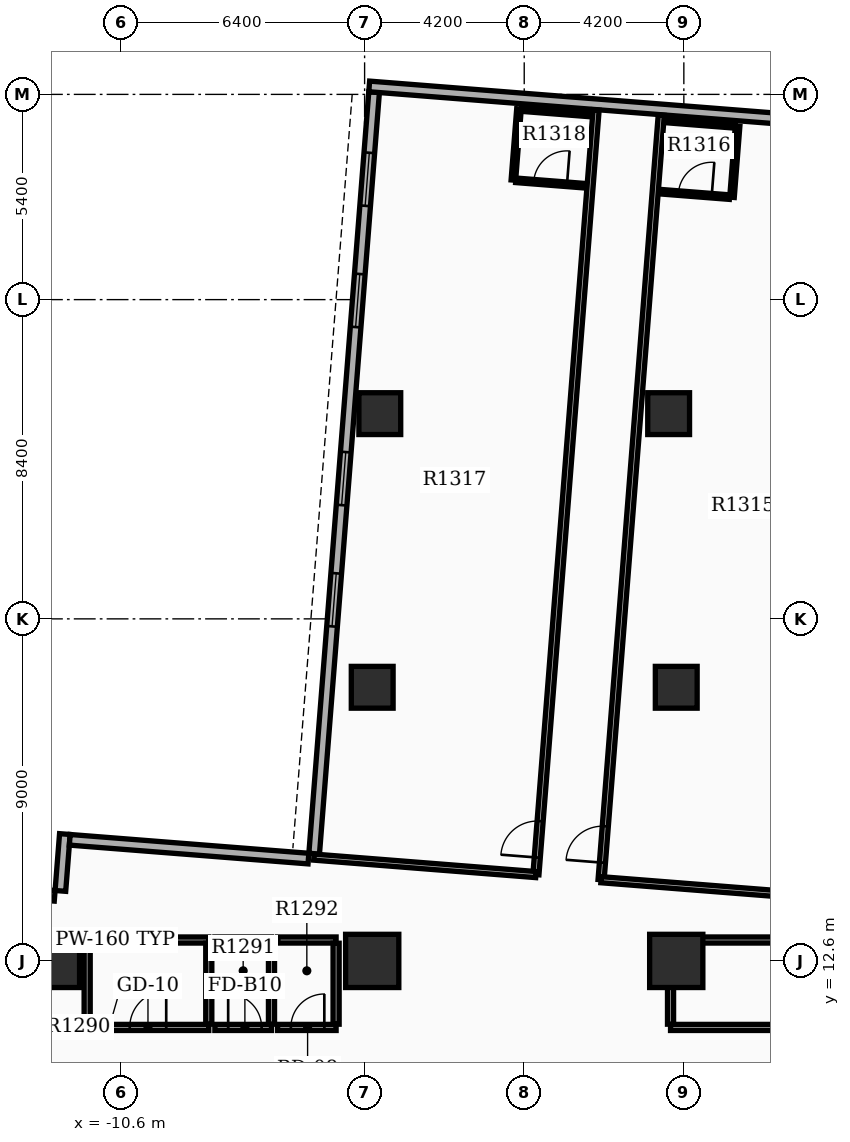
"""IFC4 building model, lengths in metres.
Left out: names, types, materials, properties, quantities, classifications, styles, units other than length and angle.
Written with IfcOpenShell. Run it as: python <this file> out.ifc"""

import sys

from ifc_helpers import new_model, si_unit, direction, frame, frame_2d, origin, origin_2d, place, context, subcontext, project, spatial, rectangle, extrude, element, fill, save


model = new_model("IFC4")
c1 = context("Model", 3, precision=1e-05, world=origin(), true_north=direction((0.0, 1.0)))
c2 = subcontext(c1, "Body", "Model", "MODEL_VIEW")
j1 = project(units=[si_unit("LENGTHUNIT", "METRE"), si_unit("PLANEANGLEUNIT", "RADIAN")], contexts=[c1])
p1 = place(None, origin())
s1 = spatial("IfcSite", under=j1, at=p1, CompositionType="ELEMENT")
p2 = place(p1, origin())
s2 = spatial("IfcBuilding", under=s1, at=p2, CompositionType="ELEMENT")
p3 = place(p2, frame((0.0, 0.0, 83.4)))
s3 = spatial("IfcBuildingStorey", under=s2, at=p3, CompositionType="ELEMENT", Elevation=83.4)
for number, where, z_axis, x_axis in (
    (1, (-12.4, 12.6, 0.0), (0.0, 0.0, 1.0), (1.0, 0.0, 0.0)),
    (2, (4.0, 12.6, 0.0), (0.0, 0.0, 1.0), (1.0, 0.0, 0.0)),
    (3, (-4.0, 12.6, 0.0), (0.0, 0.0, 1.0), (1.0, 0.0, 0.0)),
):
    element("IfcColumn", number, at=place(p3, frame(where, z_axis=z_axis, x_axis=x_axis)), inside=s3, PredefinedType="COLUMN", context=c2, shape_type="SweptSolid", body=[
        extrude(rectangle(XDim=1.4, YDim=1.4, at=origin_2d()), origin(), (0.0, 0.0, 1.0), 3.9),
    ])
for number, where, z_axis, x_axis in (
    (4, (-4.0, 19.8, 0.0), (0.0, 0.0, 1.0), (1.0, 0.0, 0.0)),
    (5, (4.0, 19.8, 0.0), (0.0, 0.0, 1.0), (1.0, 0.0, 0.0)),
    (6, (-3.8, 27.0, 0.0), (0.0, 0.0, 1.0), (1.0, 0.0, 0.0)),
    (7, (3.8, 27.0, 0.0), (0.0, 0.0, 1.0), (1.0, 0.0, 0.0)),
):
    element("IfcColumn", number, at=place(p3, frame(where, z_axis=z_axis, x_axis=x_axis)), inside=s3, PredefinedType="COLUMN", context=c2, shape_type="SweptSolid", body=[
        extrude(rectangle(XDim=1.1, YDim=1.1, at=origin_2d()), origin(), (0.0, 0.0, 1.0), 3.9),
    ])
p4 = place(p3, frame((-3.95, 35.459, 0.0), z_axis=(0.0, 0.0, 1.0), x_axis=(-0.078452802979, -0.996917828963, 0.0)))
e8 = element("IfcWall", 8, at=p4, inside=s3, PredefinedType="STANDARD", context=c2, shape_type="SweptSolid", body=[
    extrude(rectangle(XDim=20.1, YDim=0.28, at=frame_2d((10.05, 0.0))), origin(), (0.0, 0.0, 1.0), 2.91),
])
p5 = place(p4, frame((1.6, 0.0, 0.8)))
e9 = element("IfcOpeningElement", 9, at=p5, cuts=e8, PredefinedType="OPENING", context=c2, shape_type="SweptSolid", body=[
    extrude(rectangle(XDim=1.4, YDim=1.6, at=frame_2d((0.7, 0.8))), frame((0.0, 0.15, 0.0), z_axis=(0.0, -1.0, 0.0), x_axis=(1.0, 0.0, 0.0)), (0.0, 0.0, 1.0), 0.3),
])
p6 = place(p4, frame((4.8, 0.0, 0.8)))
e10 = element("IfcOpeningElement", 10, at=p6, cuts=e8, PredefinedType="OPENING", context=c2, shape_type="SweptSolid", body=[
    extrude(rectangle(XDim=1.4, YDim=1.6, at=frame_2d((0.7, 0.8))), frame((0.0, 0.15, 0.0), z_axis=(0.0, -1.0, 0.0), x_axis=(1.0, 0.0, 0.0)), (0.0, 0.0, 1.0), 0.3),
])
p7 = place(p4, frame((9.5, 0.0, 0.8)))
e11 = element("IfcOpeningElement", 11, at=p7, cuts=e8, PredefinedType="OPENING", context=c2, shape_type="SweptSolid", body=[
    extrude(rectangle(XDim=1.4, YDim=1.6, at=frame_2d((0.7, 0.8))), frame((0.0, 0.15, 0.0), z_axis=(0.0, -1.0, 0.0), x_axis=(1.0, 0.0, 0.0)), (0.0, 0.0, 1.0), 0.3),
])
p8 = place(p4, frame((12.7, 0.0, 0.8)))
e12 = element("IfcOpeningElement", 12, at=p8, cuts=e8, PredefinedType="OPENING", context=c2, shape_type="SweptSolid", body=[
    extrude(rectangle(XDim=1.4, YDim=1.6, at=frame_2d((0.7, 0.8))), frame((0.0, 0.15, 0.0), z_axis=(0.0, -1.0, 0.0), x_axis=(1.0, 0.0, 0.0)), (0.0, 0.0, 1.0), 0.3),
])
p9 = place(p3, frame((9.599, 34.533, 0.0), z_axis=(0.0, 0.0, 1.0), x_axis=(-0.996916198482, 0.078473519122, 0.0)))
e13 = element("IfcWall", 13, at=p9, inside=s3, PredefinedType="STANDARD", context=c2, shape_type="SweptSolid", body=[
    extrude(rectangle(XDim=13.72, YDim=0.28, at=frame_2d((6.86, 0.0))), origin(), (0.0, 0.0, 1.0), 2.91),
])
p10 = place(p9, frame((0.85, 0.0, 0.85)))
e14 = element("IfcOpeningElement", 14, at=p10, cuts=e13, PredefinedType="OPENING", context=c2, shape_type="SweptSolid", body=[
    extrude(rectangle(XDim=1.0, YDim=1.5, at=frame_2d((0.5, 0.75))), frame((0.0, 0.15, 0.0), z_axis=(0.0, -1.0, 0.0), x_axis=(1.0, 0.0, 0.0)), (0.0, 0.0, 1.0), 0.3),
])
p11 = place(p3, frame((-13.571, 14.409, 0.0), z_axis=(0.0, 0.0, 1.0), x_axis=(0.996918772, -0.078440818672, 0.0)))
e15 = element("IfcWall", 15, at=p11, inside=s3, PredefinedType="STANDARD", context=c2, shape_type="SweptSolid", body=[
    extrude(rectangle(XDim=1.22, YDim=0.28, at=frame_2d((0.61, 0.0))), origin(), (0.0, 0.0, 1.0), 2.91),
])
p12 = place(p3, frame((-12.205, 14.442, 0.0), z_axis=(0.0, 0.0, 1.0), x_axis=(0.078451338629, 0.9969179442, 0.0)))
e16 = element("IfcWall", 16, at=p12, inside=s3, PredefinedType="STANDARD", context=c2, shape_type="SweptSolid", body=[
    extrude(rectangle(XDim=1.5, YDim=0.28, at=frame_2d((0.75, 0.0))), origin(), (0.0, 0.0, 1.0), 2.91),
])
p13 = place(p3, frame((-11.958, 15.787, 0.0), z_axis=(0.0, 0.0, 1.0), x_axis=(0.996916125428, -0.078474447191, 0.0)))
e17 = element("IfcWall", 17, at=p13, inside=s3, PredefinedType="STANDARD", context=c2, shape_type="SweptSolid", body=[
    extrude(rectangle(XDim=6.3, YDim=0.28, at=frame_2d((3.15, 0.0))), origin(), (0.0, 0.0, 1.0), 2.91),
])
p14 = place(p3, frame((-11.5, 10.85, 0.0), z_axis=(0.0, 0.0, 1.0), x_axis=(1.0, 0.0, 0.0)))
e18 = element("IfcWall", 18, at=p14, inside=s3, PredefinedType="PARTITIONING", context=c2, shape_type="SweptSolid", body=[
    extrude(rectangle(XDim=3.2, YDim=0.16, at=frame_2d((1.6, 0.0))), origin(), (0.0, 0.0, 1.0), 2.9),
])
p15 = place(p14, frame((1.12, 0.0, 0.0)))
e19 = element("IfcOpeningElement", 19, at=p15, cuts=e18, PredefinedType="OPENING", context=c2, shape_type="SweptSolid", body=[
    extrude(rectangle(XDim=0.96, YDim=2.15, at=frame_2d((0.48, 1.075))), frame((0.0, 0.09, 0.0), z_axis=(0.0, -1.0, 0.0), x_axis=(1.0, 0.0, 0.0)), (0.0, 0.0, 1.0), 0.18),
])
p16 = place(p3, frame((-11.5, 13.15, 0.0), z_axis=(0.0, 0.0, 1.0), x_axis=(1.0, 0.0, 0.0)))
e20 = element("IfcWall", 20, at=p16, inside=s3, PredefinedType="PARTITIONING", context=c2, shape_type="SweptSolid", body=[
    extrude(rectangle(XDim=3.2, YDim=0.16, at=frame_2d((1.6, 0.0))), origin(), (0.0, 0.0, 1.0), 2.9),
])
for number, where, z_axis, x_axis in (
    (21, (-11.5, 10.935, 0.0), (0.0, 0.0, 1.0), (0.0, 1.0, 0.0)),
    (22, (-8.3, 10.935, 0.0), (0.0, 0.0, 1.0), (0.0, 1.0, 0.0)),
):
    element("IfcWall", number, at=place(p3, frame(where, z_axis=z_axis, x_axis=x_axis)), inside=s3, PredefinedType="PARTITIONING", context=c2, shape_type="SweptSolid", body=[
        extrude(rectangle(XDim=2.13, YDim=0.16, at=frame_2d((1.065, 0.0))), origin(), (0.0, 0.0, 1.0), 2.9),
    ])
p17 = place(p3, frame((-8.14, 10.85, 0.0), z_axis=(0.0, 0.0, 1.0), x_axis=(1.0, 0.0, 0.0)))
e23 = element("IfcWall", 23, at=p17, inside=s3, PredefinedType="PARTITIONING", context=c2, shape_type="SweptSolid", body=[
    extrude(rectangle(XDim=1.49, YDim=0.16, at=frame_2d((0.745, 0.0))), origin(), (0.0, 0.0, 1.0), 2.9),
])
p18 = place(p17, frame((0.35, 0.0, 0.0)))
e24 = element("IfcOpeningElement", 24, at=p18, cuts=e23, PredefinedType="OPENING", context=c2, shape_type="SweptSolid", body=[
    extrude(rectangle(XDim=0.88, YDim=2.1, at=frame_2d((0.44, 1.05))), frame((0.0, 0.09, 0.0), z_axis=(0.0, -1.0, 0.0), x_axis=(1.0, 0.0, 0.0)), (0.0, 0.0, 1.0), 0.18),
])
p19 = place(p3, frame((-8.14, 13.15, 0.0), z_axis=(0.0, 0.0, 1.0), x_axis=(1.0, 0.0, 0.0)))
e25 = element("IfcWall", 25, at=p19, inside=s3, PredefinedType="PARTITIONING", context=c2, shape_type="SweptSolid", body=[
    extrude(rectangle(XDim=1.49, YDim=0.16, at=frame_2d((0.745, 0.0))), origin(), (0.0, 0.0, 1.0), 2.9),
])
p20 = place(p3, frame((-6.65, 10.935, 0.0), z_axis=(0.0, 0.0, 1.0), x_axis=(0.0, 1.0, 0.0)))
e26 = element("IfcWall", 26, at=p20, inside=s3, PredefinedType="PARTITIONING", context=c2, shape_type="SweptSolid", body=[
    extrude(rectangle(XDim=2.13, YDim=0.16, at=frame_2d((1.065, 0.0))), origin(), (0.0, 0.0, 1.0), 2.9),
])
p21 = place(p3, frame((-6.49, 10.85, 0.0), z_axis=(0.0, 0.0, 1.0), x_axis=(1.0, 0.0, 0.0)))
e27 = element("IfcWall", 27, at=p21, inside=s3, PredefinedType="PARTITIONING", context=c2, shape_type="SweptSolid", body=[
    extrude(rectangle(XDim=1.54, YDim=0.16, at=frame_2d((0.77, 0.0))), origin(), (0.0, 0.0, 1.0), 2.9),
])
p22 = place(p21, frame((0.35, 0.0, 0.0)))
e28 = element("IfcOpeningElement", 28, at=p22, cuts=e27, PredefinedType="OPENING", context=c2, shape_type="SweptSolid", body=[
    extrude(rectangle(XDim=0.88, YDim=2.15, at=frame_2d((0.44, 1.075))), frame((0.0, 0.09, 0.0), z_axis=(0.0, -1.0, 0.0), x_axis=(1.0, 0.0, 0.0)), (0.0, 0.0, 1.0), 0.18),
])
p23 = place(p3, frame((-6.49, 13.15, 0.0), z_axis=(0.0, 0.0, 1.0), x_axis=(1.0, 0.0, 0.0)))
e29 = element("IfcWall", 29, at=p23, inside=s3, PredefinedType="PARTITIONING", context=c2, shape_type="SweptSolid", body=[
    extrude(rectangle(XDim=1.54, YDim=0.16, at=frame_2d((0.77, 0.0))), origin(), (0.0, 0.0, 1.0), 2.9),
])
p24 = place(p3, frame((-4.95, 10.935, 0.0), z_axis=(0.0, 0.0, 1.0), x_axis=(0.0, 1.0, 0.0)))
e30 = element("IfcWall", 30, at=p24, inside=s3, PredefinedType="PARTITIONING", context=c2, shape_type="SweptSolid", body=[
    extrude(rectangle(XDim=2.13, YDim=0.16, at=frame_2d((1.065, 0.0))), origin(), (0.0, 0.0, 1.0), 2.9),
])
p25 = place(p3, frame((3.85, 10.85, 0.0), z_axis=(0.0, 0.0, 1.0), x_axis=(1.0, 0.0, 0.0)))
e31 = element("IfcWall", 31, at=p25, inside=s3, PredefinedType="PARTITIONING", context=c2, shape_type="SweptSolid", body=[
    extrude(rectangle(XDim=8.55, YDim=0.16, at=frame_2d((4.275, 0.0))), origin(), (0.0, 0.0, 1.0), 2.9),
])
p26 = place(p25, frame((3.795, 0.0, 0.0)))
e32 = element("IfcOpeningElement", 32, at=p26, cuts=e31, PredefinedType="OPENING", context=c2, shape_type="SweptSolid", body=[
    extrude(rectangle(XDim=0.96, YDim=2.15, at=frame_2d((0.48, 1.075))), frame((0.0, 0.09, 0.0), z_axis=(0.0, -1.0, 0.0), x_axis=(1.0, 0.0, 0.0)), (0.0, 0.0, 1.0), 0.18),
])
p27 = place(p3, frame((3.85, 13.15, 0.0), z_axis=(0.0, 0.0, 1.0), x_axis=(1.0, 0.0, 0.0)))
e33 = element("IfcWall", 33, at=p27, inside=s3, PredefinedType="PARTITIONING", context=c2, shape_type="SweptSolid", body=[
    extrude(rectangle(XDim=8.55, YDim=0.16, at=frame_2d((4.275, 0.0))), origin(), (0.0, 0.0, 1.0), 2.9),
])
p28 = place(p3, frame((3.85, 10.935, 0.0), z_axis=(0.0, 0.0, 1.0), x_axis=(0.0, 1.0, 0.0)))
e34 = element("IfcWall", 34, at=p28, inside=s3, PredefinedType="PARTITIONING", context=c2, shape_type="SweptSolid", body=[
    extrude(rectangle(XDim=2.13, YDim=0.16, at=frame_2d((1.065, 0.0))), origin(), (0.0, 0.0, 1.0), 2.9),
])
p29 = place(p3, frame((2.022, 14.737, 0.0), z_axis=(0.0, 0.0, 1.0), x_axis=(0.078461408156, 0.996917151738, 0.0)))
e35 = element("IfcWall", 35, at=p29, inside=s3, PredefinedType="PARTITIONING", context=c2, shape_type="SweptSolid", body=[
    extrude(rectangle(XDim=20.182, YDim=0.16, at=frame_2d((10.091, 0.0))), origin(), (0.0, 0.0, 1.0), 2.9),
])
p30 = place(p29, frame((0.45, 0.0, 0.0)))
e36 = element("IfcOpeningElement", 36, at=p30, cuts=e35, PredefinedType="OPENING", context=c2, shape_type="SweptSolid", body=[
    extrude(rectangle(XDim=0.96, YDim=2.15, at=frame_2d((0.48, 1.075))), frame((0.0, 0.09, 0.0), z_axis=(0.0, -1.0, 0.0), x_axis=(1.0, 0.0, 0.0)), (0.0, 0.0, 1.0), 0.18),
])
p31 = place(p3, frame((2.022, 14.737, 0.0), z_axis=(0.0, 0.0, 1.0), x_axis=(0.996918158581, -0.078448614343, 0.0)))
e37 = element("IfcWall", 37, at=p31, inside=s3, PredefinedType="PARTITIONING", context=c2, shape_type="SweptSolid", body=[
    extrude(rectangle(XDim=5.86, YDim=0.16, at=frame_2d((2.93, 0.0))), origin(), (0.0, 0.0, 1.0), 2.9),
])
p32 = place(p3, frame((3.588, 32.84, 0.0), z_axis=(0.0, 0.0, 1.0), x_axis=(0.996916400774, -0.0784709492, 0.0)))
e38 = element("IfcWall", 38, at=p32, inside=s3, PredefinedType="PARTITIONING", context=c2, shape_type="SweptSolid", body=[
    extrude(rectangle(XDim=1.82, YDim=0.12, at=frame_2d((0.91, 0.0))), origin(), (0.0, 0.0, 1.0), 2.9),
])
p33 = place(p32, frame((0.47, 0.0, 0.0)))
e39 = element("IfcOpeningElement", 39, at=p33, cuts=e38, PredefinedType="OPENING", context=c2, shape_type="SweptSolid", body=[
    extrude(rectangle(XDim=0.88, YDim=2.1, at=frame_2d((0.44, 1.05))), frame((0.0, 0.07, 0.0), z_axis=(0.0, -1.0, 0.0), x_axis=(1.0, 0.0, 0.0)), (0.0, 0.0, 1.0), 0.14),
])
p34 = place(p3, frame((3.735, 34.714, 0.0), z_axis=(0.0, 0.0, 1.0), x_axis=(0.996916400774, -0.0784709492, 0.0)))
e40 = element("IfcWall", 40, at=p34, inside=s3, PredefinedType="PARTITIONING", context=c2, shape_type="SweptSolid", body=[
    extrude(rectangle(XDim=1.82, YDim=0.12, at=frame_2d((0.91, 0.0))), origin(), (0.0, 0.0, 1.0), 2.9),
])
p35 = place(p3, frame((5.467, 32.692, 0.0), z_axis=(0.0, 0.0, 1.0), x_axis=(0.07843418698, 0.996919293781, 0.0)))
e41 = element("IfcWall", 41, at=p35, inside=s3, PredefinedType="PARTITIONING", context=c2, shape_type="SweptSolid", body=[
    extrude(rectangle(XDim=1.88, YDim=0.12, at=frame_2d((0.94, 0.0))), origin(), (0.0, 0.0, 1.0), 2.9),
])
p36 = place(p3, frame((0.308, 14.872, 0.0), z_axis=(0.0, 0.0, 1.0), x_axis=(0.0784484395, 0.996918172339, 0.0)))
e42 = element("IfcWall", 42, at=p36, inside=s3, PredefinedType="PARTITIONING", context=c2, shape_type="SweptSolid", body=[
    extrude(rectangle(XDim=20.182, YDim=0.16, at=frame_2d((10.091, 0.0))), origin(), (0.0, 0.0, 1.0), 2.9),
])
p37 = place(p36, frame((0.45, 0.0, 0.0)))
e43 = element("IfcOpeningElement", 43, at=p37, cuts=e42, PredefinedType="OPENING", context=c2, shape_type="SweptSolid", body=[
    extrude(rectangle(XDim=0.96, YDim=2.15, at=frame_2d((0.48, 1.075))), frame((0.0, 0.09, 0.0), z_axis=(0.0, -1.0, 0.0), x_axis=(1.0, 0.0, 0.0)), (0.0, 0.0, 1.0), 0.18),
])
p38 = place(p3, frame((0.308, 14.872, 0.0), z_axis=(0.0, 0.0, 1.0), x_axis=(-0.996914899516, 0.078490019252, 0.0)))
e44 = element("IfcWall", 44, at=p38, inside=s3, PredefinedType="PARTITIONING", context=c2, shape_type="SweptSolid", body=[
    extrude(rectangle(XDim=5.86, YDim=0.16, at=frame_2d((2.93, 0.0))), origin(), (0.0, 0.0, 1.0), 2.9),
])
p39 = place(p3, frame((-0.221, 33.139, 0.0), z_axis=(0.0, 0.0, 1.0), x_axis=(0.996916400774, -0.0784709492, 0.0)))
e45 = element("IfcWall", 45, at=p39, inside=s3, PredefinedType="PARTITIONING", context=c2, shape_type="SweptSolid", body=[
    extrude(rectangle(XDim=1.82, YDim=0.12, at=frame_2d((0.91, 0.0))), origin(), (0.0, 0.0, 1.0), 2.9),
])
p40 = place(p39, frame((0.47, 0.0, 0.0)))
e46 = element("IfcOpeningElement", 46, at=p40, cuts=e45, PredefinedType="OPENING", context=c2, shape_type="SweptSolid", body=[
    extrude(rectangle(XDim=0.88, YDim=2.1, at=frame_2d((0.44, 1.05))), frame((0.0, 0.07, 0.0), z_axis=(0.0, -1.0, 0.0), x_axis=(1.0, 0.0, 0.0)), (0.0, 0.0, 1.0), 0.14),
])
p41 = place(p3, frame((-0.073, 35.014, 0.0), z_axis=(0.0, 0.0, 1.0), x_axis=(0.996915574626, -0.078481444107, 0.0)))
e47 = element("IfcWall", 47, at=p41, inside=s3, PredefinedType="PARTITIONING", context=c2, shape_type="SweptSolid", body=[
    extrude(rectangle(XDim=1.82, YDim=0.12, at=frame_2d((0.91, 0.0))), origin(), (0.0, 0.0, 1.0), 2.9),
])
p42 = place(p3, frame((-0.285, 33.145, 0.0), z_axis=(0.0, 0.0, 1.0), x_axis=(0.07843418698, 0.996919293781, 0.0)))
e48 = element("IfcWall", 48, at=p42, inside=s3, PredefinedType="PARTITIONING", context=c2, shape_type="SweptSolid", body=[
    extrude(rectangle(XDim=1.88, YDim=0.12, at=frame_2d((0.94, 0.0))), origin(), (0.0, 0.0, 1.0), 2.9),
])
p43 = place(p5, origin())
e49 = element("IfcWindow", 49, at=p43, inside=s3, PartitioningType="SINGLE_PANEL", PredefinedType="WINDOW", context=c2, shape_type="SweptSolid", body=[
    extrude(rectangle(XDim=1.4, YDim=1.6, at=frame_2d((0.7, 0.8))), frame((0.0, 0.03, 0.0), z_axis=(0.0, -1.0, 0.0), x_axis=(1.0, 0.0, 0.0)), (0.0, 0.0, 1.0), 0.06),
])
fill(e9, e49)
p44 = place(p6, origin())
e50 = element("IfcWindow", 50, at=p44, inside=s3, PartitioningType="SINGLE_PANEL", PredefinedType="WINDOW", context=c2, shape_type="SweptSolid", body=[
    extrude(rectangle(XDim=1.4, YDim=1.6, at=frame_2d((0.7, 0.8))), frame((0.0, 0.03, 0.0), z_axis=(0.0, -1.0, 0.0), x_axis=(1.0, 0.0, 0.0)), (0.0, 0.0, 1.0), 0.06),
])
fill(e10, e50)
p45 = place(p7, origin())
e51 = element("IfcWindow", 51, at=p45, inside=s3, PartitioningType="SINGLE_PANEL", PredefinedType="WINDOW", context=c2, shape_type="SweptSolid", body=[
    extrude(rectangle(XDim=1.4, YDim=1.6, at=frame_2d((0.7, 0.8))), frame((0.0, 0.03, 0.0), z_axis=(0.0, -1.0, 0.0), x_axis=(1.0, 0.0, 0.0)), (0.0, 0.0, 1.0), 0.06),
])
fill(e11, e51)
p46 = place(p8, origin())
e52 = element("IfcWindow", 52, at=p46, inside=s3, PartitioningType="SINGLE_PANEL", PredefinedType="WINDOW", context=c2, shape_type="SweptSolid", body=[
    extrude(rectangle(XDim=1.4, YDim=1.6, at=frame_2d((0.7, 0.8))), frame((0.0, 0.03, 0.0), z_axis=(0.0, -1.0, 0.0), x_axis=(1.0, 0.0, 0.0)), (0.0, 0.0, 1.0), 0.06),
])
fill(e12, e52)
p47 = place(p15, origin())
e53 = element("IfcDoor", 53, at=p47, inside=s3, OperationType="SINGLE_SWING_RIGHT", PredefinedType="DOOR", context=c2, shape_type="SweptSolid", body=[
    extrude(rectangle(XDim=0.96, YDim=2.15, at=frame_2d((0.48, 1.075))), frame((0.0, 0.025, 0.0), z_axis=(0.0, -1.0, 0.0), x_axis=(1.0, 0.0, 0.0)), (0.0, 0.0, 1.0), 0.05),
])
fill(e19, e53)
p48 = place(p18, origin())
e54 = element("IfcDoor", 54, at=p48, inside=s3, OperationType="SINGLE_SWING_LEFT", PredefinedType="DOOR", context=c2, shape_type="SweptSolid", body=[
    extrude(rectangle(XDim=0.88, YDim=2.1, at=frame_2d((0.44, 1.05))), frame((0.0, 0.025, 0.0), z_axis=(0.0, -1.0, 0.0), x_axis=(1.0, 0.0, 0.0)), (0.0, 0.0, 1.0), 0.05),
])
fill(e24, e54)
p49 = place(p22, origin())
e55 = element("IfcDoor", 55, at=p49, inside=s3, OperationType="SINGLE_SWING_RIGHT", PredefinedType="DOOR", context=c2, shape_type="SweptSolid", body=[
    extrude(rectangle(XDim=0.88, YDim=2.15, at=frame_2d((0.44, 1.075))), frame((0.0, 0.025, 0.0), z_axis=(0.0, -1.0, 0.0), x_axis=(1.0, 0.0, 0.0)), (0.0, 0.0, 1.0), 0.05),
])
fill(e28, e55)
p50 = place(p30, origin())
e56 = element("IfcDoor", 56, at=p50, inside=s3, OperationType="SINGLE_SWING_LEFT", PredefinedType="DOOR", context=c2, shape_type="SweptSolid", body=[
    extrude(rectangle(XDim=0.96, YDim=2.15, at=frame_2d((0.48, 1.075))), frame((0.0, 0.025, 0.0), z_axis=(0.0, -1.0, 0.0), x_axis=(1.0, 0.0, 0.0)), (0.0, 0.0, 1.0), 0.05),
])
fill(e36, e56)
p51 = place(p33, origin())
e57 = element("IfcDoor", 57, at=p51, inside=s3, OperationType="SINGLE_SWING_RIGHT", PredefinedType="DOOR", context=c2, shape_type="SweptSolid", body=[
    extrude(rectangle(XDim=0.88, YDim=2.1, at=frame_2d((0.44, 1.05))), frame((0.0, 0.025, 0.0), z_axis=(0.0, -1.0, 0.0), x_axis=(1.0, 0.0, 0.0)), (0.0, 0.0, 1.0), 0.05),
])
fill(e39, e57)
p52 = place(p37, origin())
e58 = element("IfcDoor", 58, at=p52, inside=s3, OperationType="SINGLE_SWING_LEFT", PredefinedType="DOOR", context=c2, shape_type="SweptSolid", body=[
    extrude(rectangle(XDim=0.96, YDim=2.15, at=frame_2d((0.48, 1.075))), frame((0.0, 0.025, 0.0), z_axis=(0.0, -1.0, 0.0), x_axis=(1.0, 0.0, 0.0)), (0.0, 0.0, 1.0), 0.05),
])
fill(e43, e58)
p53 = place(p40, origin())
e59 = element("IfcDoor", 59, at=p53, inside=s3, OperationType="SINGLE_SWING_RIGHT", PredefinedType="DOOR", context=c2, shape_type="SweptSolid", body=[
    extrude(rectangle(XDim=0.88, YDim=2.1, at=frame_2d((0.44, 1.05))), frame((0.0, 0.025, 0.0), z_axis=(0.0, -1.0, 0.0), x_axis=(1.0, 0.0, 0.0)), (0.0, 0.0, 1.0), 0.05),
])
fill(e46, e59)
save(model, sys.argv[1])
